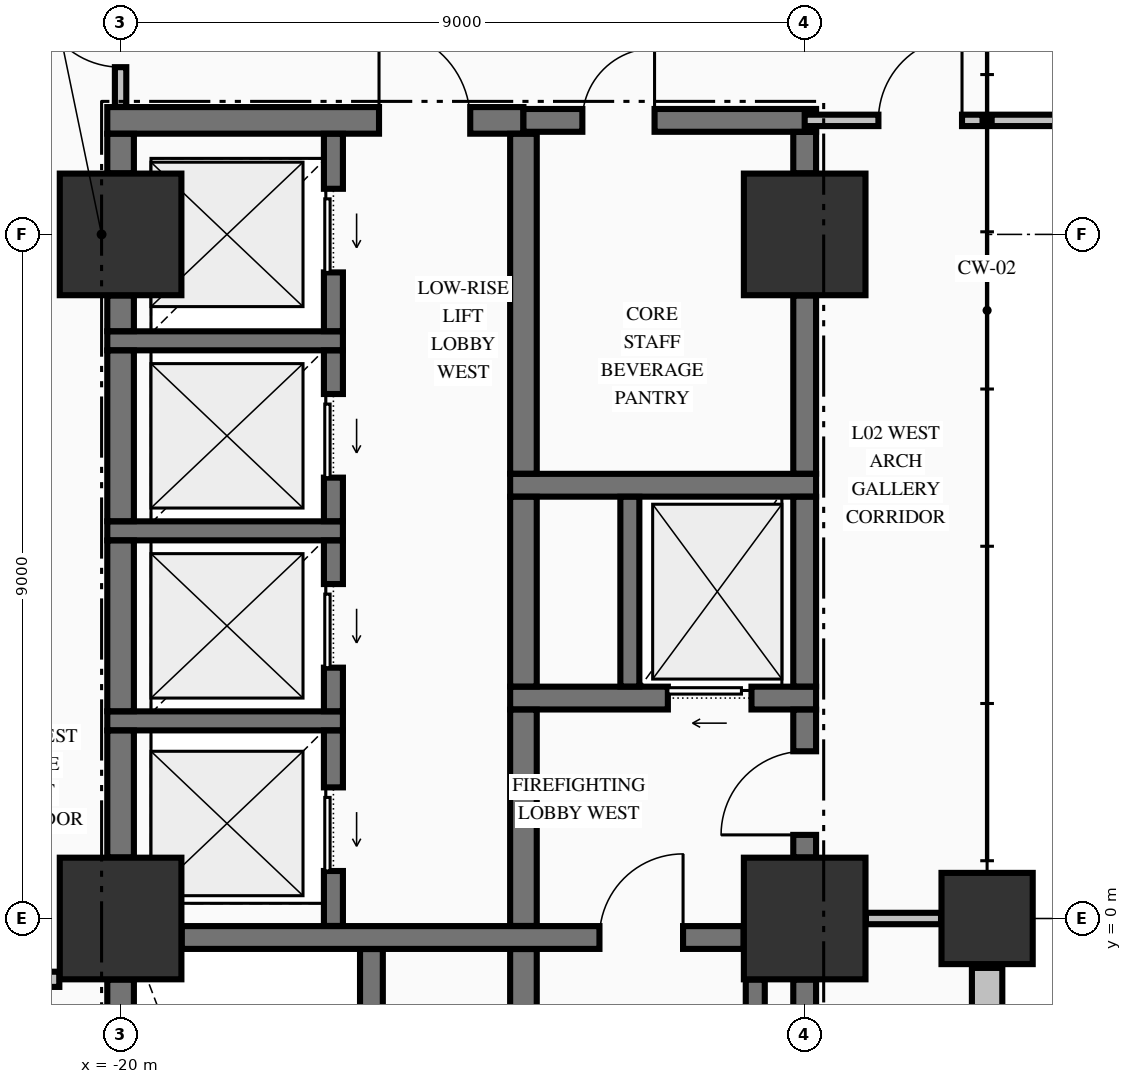
"""IFC4 building model, lengths in metres.
Left out: names, types, materials, properties, quantities, classifications, styles, units other than length and angle.
Written with IfcOpenShell. Run it as: python <this file> out.ifc"""

import sys

from ifc_helpers import new_model, si_unit, direction, frame, frame_2d, origin, origin_2d, place, context, subcontext, project, spatial, rectangle, extrude, element, fill, save


model = new_model("IFC4")
c1 = context("Model", 3, precision=1e-05, world=origin(), true_north=direction((0.0, 1.0)))
c2 = subcontext(c1, "Body", "Model", "MODEL_VIEW")
j1 = project(units=[si_unit("LENGTHUNIT", "METRE"), si_unit("PLANEANGLEUNIT", "RADIAN")], contexts=[c1])
p1 = place(None, origin())
s1 = spatial("IfcSite", under=j1, at=p1, CompositionType="ELEMENT")
p2 = place(p1, origin())
s2 = spatial("IfcBuilding", under=s1, at=p2, CompositionType="ELEMENT")
p3 = place(p2, frame((0.0, 0.0, 10.88)))
s3 = spatial("IfcBuildingStorey", under=s2, at=p3, CompositionType="ELEMENT", Elevation=10.88)
for number, where, z_axis, x_axis in (
    (1, (-20.0, 0.0, 0.0), (0.0, 0.0, 1.0), (1.0, 0.0, 0.0)),
    (2, (-20.0, 9.0, 0.0), (0.0, 0.0, 1.0), (1.0, 0.0, 0.0)),
    (3, (-11.0, 0.0, 0.0), (0.0, 0.0, 1.0), (1.0, 0.0, 0.0)),
    (4, (-11.0, 9.0, 0.0), (0.0, 0.0, 1.0), (1.0, 0.0, 0.0)),
):
    element("IfcColumn", number, at=place(p3, frame(where, z_axis=z_axis, x_axis=x_axis)), inside=s3, PredefinedType="COLUMN", context=c2, shape_type="SweptSolid", body=[
        extrude(rectangle(XDim=1.6, YDim=1.6, at=origin_2d()), origin(), (0.0, 0.0, 1.0), 5.09),
    ])
p4 = place(p3, frame((-8.6, 0.0, 0.0), z_axis=(0.0, 0.0, 1.0), x_axis=(1.0, 0.0, 0.0)))
e5 = element("IfcColumn", 5, at=p4, inside=s3, PredefinedType="COLUMN", context=c2, shape_type="SweptSolid", body=[
    extrude(rectangle(XDim=1.2, YDim=1.2, at=origin_2d()), origin(), (0.0, 0.0, 1.0), 5.09),
])
p5 = place(p3, frame((-8.6, -25.37, 0.0), z_axis=(0.0, 0.0, 1.0), x_axis=(0.0, 1.0, 0.0)))
e6 = element("IfcWall", 6, at=p5, inside=s3, PredefinedType="STANDARD", context=c2, shape_type="SweptSolid", body=[
    extrude(rectangle(XDim=24.72, YDim=0.4, at=frame_2d((12.36, 0.0))), origin(), (0.0, 0.0, 1.0), 4.132),
])
p6 = place(p3, frame((-19.196, -0.25, 0.0), z_axis=(0.0, 0.0, 1.0), x_axis=(1.0, 0.0, 0.0)))
e7 = element("IfcWall", 7, at=p6, inside=s3, PredefinedType="SHEAR", context=c2, shape_type="SweptSolid", body=[
    extrude(rectangle(XDim=7.392, YDim=0.3, at=frame_2d((3.696, 0.0))), origin(), (0.0, 0.0, 1.0), 5.09),
])
p7 = place(p6, frame((5.496, 0.0, 0.0)))
e8 = element("IfcOpeningElement", 8, at=p7, cuts=e7, PredefinedType="OPENING", context=c2, shape_type="SweptSolid", body=[
    extrude(rectangle(XDim=1.1, YDim=2.15, at=frame_2d((0.55, 1.075))), frame((0.0, 0.16, 0.0), z_axis=(0.0, -1.0, 0.0), x_axis=(1.0, 0.0, 0.0)), (0.0, 0.0, 1.0), 0.32),
])
p8 = place(p3, frame((-20.175, 2.6, 0.0), z_axis=(0.0, 0.0, 1.0), x_axis=(1.0, 0.0, 0.0)))
e9 = element("IfcWall", 9, at=p8, inside=s3, PredefinedType="SOLIDWALL", context=c2, shape_type="SweptSolid", body=[
    extrude(rectangle(XDim=3.1, YDim=0.25, at=frame_2d((1.55, 0.0))), origin(), (0.0, 0.0, 1.0), 5.09),
])
p9 = place(p3, frame((-14.875, 2.9, 0.0), z_axis=(0.0, 0.0, 1.0), x_axis=(1.0, 0.0, 0.0)))
e10 = element("IfcWall", 10, at=p9, inside=s3, PredefinedType="SHEAR", context=c2, shape_type="SweptSolid", body=[
    extrude(rectangle(XDim=4.025, YDim=0.3, at=frame_2d((2.012, 0.0))), origin(), (0.0, 0.0, 1.0), 5.09),
])
p10 = place(p9, frame((2.075, 0.0, 0.0)))
e11 = element("IfcOpeningElement", 11, at=p10, cuts=e10, PredefinedType="OPENING", context=c2, shape_type="SweptSolid", body=[
    extrude(rectangle(XDim=1.1, YDim=2.2, at=frame_2d((0.55, 1.1))), frame((0.0, 0.16, 0.0), z_axis=(0.0, -1.0, 0.0), x_axis=(1.0, 0.0, 0.0)), (0.0, 0.0, 1.0), 0.32),
])
p11 = place(p3, frame((-20.175, 5.1, 0.0), z_axis=(0.0, 0.0, 1.0), x_axis=(1.0, 0.0, 0.0)))
e12 = element("IfcWall", 12, at=p11, inside=s3, PredefinedType="SOLIDWALL", context=c2, shape_type="SweptSolid", body=[
    extrude(rectangle(XDim=3.1, YDim=0.25, at=frame_2d((1.55, 0.0))), origin(), (0.0, 0.0, 1.0), 5.09),
])
p12 = place(p3, frame((-14.875, 5.7, 0.0), z_axis=(0.0, 0.0, 1.0), x_axis=(1.0, 0.0, 0.0)))
e13 = element("IfcWall", 13, at=p12, inside=s3, PredefinedType="SHEAR", context=c2, shape_type="SweptSolid", body=[
    extrude(rectangle(XDim=4.025, YDim=0.3, at=frame_2d((2.012, 0.0))), origin(), (0.0, 0.0, 1.0), 5.09),
])
p13 = place(p3, frame((-20.175, 7.6, 0.0), z_axis=(0.0, 0.0, 1.0), x_axis=(1.0, 0.0, 0.0)))
e14 = element("IfcWall", 14, at=p13, inside=s3, PredefinedType="SOLIDWALL", context=c2, shape_type="SweptSolid", body=[
    extrude(rectangle(XDim=3.1, YDim=0.25, at=frame_2d((1.55, 0.0))), origin(), (0.0, 0.0, 1.0), 5.09),
])
p14 = place(p3, frame((-20.175, 10.5, 0.0), z_axis=(0.0, 0.0, 1.0), x_axis=(1.0, 0.0, 0.0)))
e15 = element("IfcWall", 15, at=p14, inside=s3, PredefinedType="SHEAR", context=c2, shape_type="SweptSolid", body=[
    extrude(rectangle(XDim=5.475, YDim=0.35, at=frame_2d((2.738, 0.0))), origin(), (0.0, 0.0, 1.0), 5.09),
])
p15 = place(p14, frame((3.575, 0.0, 0.0)))
e16 = element("IfcOpeningElement", 16, at=p15, cuts=e15, PredefinedType="OPENING", context=c2, shape_type="SweptSolid", body=[
    extrude(rectangle(XDim=1.2, YDim=2.15, at=frame_2d((0.6, 1.075))), frame((0.0, 0.185, 0.0), z_axis=(0.0, -1.0, 0.0), x_axis=(1.0, 0.0, 0.0)), (0.0, 0.0, 1.0), 0.37),
])
p16 = place(p3, frame((-14.7, 10.5, 0.0), z_axis=(0.0, 0.0, 1.0), x_axis=(1.0, 0.0, 0.0)))
e17 = element("IfcWall", 17, at=p16, inside=s3, PredefinedType="SHEAR", context=c2, shape_type="SweptSolid", body=[
    extrude(rectangle(XDim=3.85, YDim=0.3, at=frame_2d((1.925, 0.0))), origin(), (0.0, 0.0, 1.0), 5.09),
])
p17 = place(p16, frame((0.775, 0.0, 0.0)))
e18 = element("IfcOpeningElement", 18, at=p17, cuts=e17, PredefinedType="OPENING", context=c2, shape_type="SweptSolid", body=[
    extrude(rectangle(XDim=0.95, YDim=2.15, at=frame_2d((0.475, 1.075))), frame((0.0, 0.16, 0.0), z_axis=(0.0, -1.0, 0.0), x_axis=(1.0, 0.0, 0.0)), (0.0, 0.0, 1.0), 0.32),
])
p18 = place(p3, frame((-22.475, -0.8, 0.0), z_axis=(0.0, 0.0, 1.0), x_axis=(1.0, 0.0, 0.0)))
e19 = element("IfcWall", 19, at=p18, inside=s3, PredefinedType="PARTITIONING", context=c2, shape_type="SweptSolid", body=[
    extrude(rectangle(XDim=1.669, YDim=0.2, at=frame_2d((0.834, 0.0))), origin(), (0.0, 0.0, 1.0), 5.09),
])
p19 = place(p18, frame((0.425, 0.0, 0.0)))
e20 = element("IfcOpeningElement", 20, at=p19, cuts=e19, PredefinedType="OPENING", context=c2, shape_type="SweptSolid", body=[
    extrude(rectangle(XDim=1.0, YDim=2.15, at=frame_2d((0.5, 1.075))), frame((0.0, 0.11, 0.0), z_axis=(0.0, -1.0, 0.0), x_axis=(1.0, 0.0, 0.0)), (0.0, 0.0, 1.0), 0.22),
])
p20 = place(p3, frame((-10.194, 0.0, 0.0), z_axis=(0.0, 0.0, 1.0), x_axis=(1.0, 0.0, 0.0)))
e21 = element("IfcWall", 21, at=p20, inside=s3, PredefinedType="PARTITIONING", context=c2, shape_type="SweptSolid", body=[
    extrude(rectangle(XDim=0.988, YDim=0.15, at=frame_2d((0.494, 0.0))), origin(), (0.0, 0.0, 1.0), 4.132),
])
p21 = place(p3, frame((-11.0, 10.5, 0.0), z_axis=(0.0, 0.0, 1.0), x_axis=(1.0, 0.0, 0.0)))
e22 = element("IfcWall", 22, at=p21, inside=s3, PredefinedType="PARTITIONING", context=c2, shape_type="SweptSolid", body=[
    extrude(rectangle(XDim=2.34, YDim=0.15, at=frame_2d((1.17, 0.0))), origin(), (0.0, 0.0, 1.0), 5.09),
])
p22 = place(p21, frame((0.97, 0.0, 0.0)))
e23 = element("IfcOpeningElement", 23, at=p22, cuts=e22, PredefinedType="OPENING", context=c2, shape_type="SweptSolid", body=[
    extrude(rectangle(XDim=1.1, YDim=2.15, at=frame_2d((0.55, 1.075))), frame((0.0, 0.085, 0.0), z_axis=(0.0, -1.0, 0.0), x_axis=(1.0, 0.0, 0.0)), (0.0, 0.0, 1.0), 0.17),
])
p23 = place(p3, frame((-8.54, 10.5, 0.0), z_axis=(0.0, 0.0, 1.0), x_axis=(1.0, 0.0, 0.0)))
e24 = element("IfcWall", 24, at=p23, inside=s3, PredefinedType="PARTITIONING", context=c2, shape_type="SweptSolid", body=[
    extrude(rectangle(XDim=17.08, YDim=0.15, at=frame_2d((8.54, 0.0))), origin(), (0.0, 0.0, 1.0), 5.09),
])
p24 = place(p3, frame((-20.0, -8.196, 0.0), z_axis=(0.0, 0.0, 1.0), x_axis=(0.0, 1.0, 0.0)))
e25 = element("IfcWall", 25, at=p24, inside=s3, PredefinedType="SHEAR", context=c2, shape_type="SweptSolid", body=[
    extrude(rectangle(XDim=7.392, YDim=0.35, at=frame_2d((3.696, 0.0))), origin(), (0.0, 0.0, 1.0), 5.09),
])
p25 = place(p3, frame((-20.0, 0.804, 0.0), z_axis=(0.0, 0.0, 1.0), x_axis=(0.0, 1.0, 0.0)))
e26 = element("IfcWall", 26, at=p25, inside=s3, PredefinedType="SHEAR", context=c2, shape_type="SweptSolid", body=[
    extrude(rectangle(XDim=1.669, YDim=0.35, at=frame_2d((0.834, 0.0))), origin(), (0.0, 0.0, 1.0), 5.09),
])
for number, where, z_axis, x_axis in (
    (27, (-20.0, 2.727, 0.0), (0.0, 0.0, 1.0), (0.0, 1.0, 0.0)),
    (28, (-20.0, 5.227, 0.0), (0.0, 0.0, 1.0), (0.0, 1.0, 0.0)),
):
    element("IfcWall", number, at=place(p3, frame(where, z_axis=z_axis, x_axis=x_axis)), inside=s3, PredefinedType="SHEAR", context=c2, shape_type="SweptSolid", body=[
        extrude(rectangle(XDim=2.246, YDim=0.35, at=frame_2d((1.123, 0.0))), origin(), (0.0, 0.0, 1.0), 5.09),
    ])
p26 = place(p3, frame((-20.0, 7.727, 0.0), z_axis=(0.0, 0.0, 1.0), x_axis=(0.0, 1.0, 0.0)))
e29 = element("IfcWall", 29, at=p26, inside=s3, PredefinedType="SHEAR", context=c2, shape_type="SweptSolid", body=[
    extrude(rectangle(XDim=0.469, YDim=0.35, at=frame_2d((0.234, 0.0))), origin(), (0.0, 0.0, 1.0), 5.09),
])
p27 = place(p3, frame((-20.0, 9.804, 0.0), z_axis=(0.0, 0.0, 1.0), x_axis=(0.0, 1.0, 0.0)))
e30 = element("IfcWall", 30, at=p27, inside=s3, PredefinedType="SHEAR", context=c2, shape_type="SweptSolid", body=[
    extrude(rectangle(XDim=0.519, YDim=0.35, at=frame_2d((0.26, 0.0))), origin(), (0.0, 0.0, 1.0), 5.09),
])
p28 = place(p3, frame((-17.2, -0.098, 0.0), z_axis=(0.0, 0.0, 1.0), x_axis=(0.0, 1.0, 0.0)))
e31 = element("IfcWall", 31, at=p28, inside=s3, PredefinedType="SOLIDWALL", context=c2, shape_type="SweptSolid", body=[
    extrude(rectangle(XDim=2.571, YDim=0.25, at=frame_2d((1.285, 0.0))), origin(), (0.0, 0.0, 1.0), 5.09),
])
p29 = place(p28, frame((0.723, 0.0, 0.0)))
e32 = element("IfcOpeningElement", 32, at=p29, cuts=e31, PredefinedType="OPENING", context=c2, shape_type="SweptSolid", body=[
    extrude(rectangle(XDim=1.1, YDim=2.2, at=frame_2d((0.55, 1.1))), frame((0.0, 0.135, 0.0), z_axis=(0.0, -1.0, 0.0), x_axis=(1.0, 0.0, 0.0)), (0.0, 0.0, 1.0), 0.27),
])
p30 = place(p3, frame((-17.2, 2.727, 0.0), z_axis=(0.0, 0.0, 1.0), x_axis=(0.0, 1.0, 0.0)))
e33 = element("IfcWall", 33, at=p30, inside=s3, PredefinedType="SOLIDWALL", context=c2, shape_type="SweptSolid", body=[
    extrude(rectangle(XDim=2.246, YDim=0.25, at=frame_2d((1.123, 0.0))), origin(), (0.0, 0.0, 1.0), 5.09),
])
p31 = place(p30, frame((0.573, 0.0, 0.0)))
e34 = element("IfcOpeningElement", 34, at=p31, cuts=e33, PredefinedType="OPENING", context=c2, shape_type="SweptSolid", body=[
    extrude(rectangle(XDim=1.1, YDim=2.2, at=frame_2d((0.55, 1.1))), frame((0.0, 0.135, 0.0), z_axis=(0.0, -1.0, 0.0), x_axis=(1.0, 0.0, 0.0)), (0.0, 0.0, 1.0), 0.27),
])
p32 = place(p3, frame((-17.2, 5.227, 0.0), z_axis=(0.0, 0.0, 1.0), x_axis=(0.0, 1.0, 0.0)))
e35 = element("IfcWall", 35, at=p32, inside=s3, PredefinedType="SOLIDWALL", context=c2, shape_type="SweptSolid", body=[
    extrude(rectangle(XDim=2.246, YDim=0.25, at=frame_2d((1.123, 0.0))), origin(), (0.0, 0.0, 1.0), 5.09),
])
p33 = place(p32, frame((0.573, 0.0, 0.0)))
e36 = element("IfcOpeningElement", 36, at=p33, cuts=e35, PredefinedType="OPENING", context=c2, shape_type="SweptSolid", body=[
    extrude(rectangle(XDim=1.1, YDim=2.2, at=frame_2d((0.55, 1.1))), frame((0.0, 0.135, 0.0), z_axis=(0.0, -1.0, 0.0), x_axis=(1.0, 0.0, 0.0)), (0.0, 0.0, 1.0), 0.27),
])
p34 = place(p3, frame((-17.2, 7.727, 0.0), z_axis=(0.0, 0.0, 1.0), x_axis=(0.0, 1.0, 0.0)))
e37 = element("IfcWall", 37, at=p34, inside=s3, PredefinedType="SOLIDWALL", context=c2, shape_type="SweptSolid", body=[
    extrude(rectangle(XDim=2.596, YDim=0.25, at=frame_2d((1.298, 0.0))), origin(), (0.0, 0.0, 1.0), 5.09),
])
p35 = place(p34, frame((0.773, 0.0, 0.0)))
e38 = element("IfcOpeningElement", 38, at=p35, cuts=e37, PredefinedType="OPENING", context=c2, shape_type="SweptSolid", body=[
    extrude(rectangle(XDim=1.1, YDim=2.2, at=frame_2d((0.55, 1.1))), frame((0.0, 0.135, 0.0), z_axis=(0.0, -1.0, 0.0), x_axis=(1.0, 0.0, 0.0)), (0.0, 0.0, 1.0), 0.27),
])
p36 = place(p3, frame((-16.7, -9.773, 0.0), z_axis=(0.0, 0.0, 1.0), x_axis=(0.0, 1.0, 0.0)))
e39 = element("IfcWall", 39, at=p36, inside=s3, PredefinedType="SHEAR", context=c2, shape_type="SweptSolid", body=[
    extrude(rectangle(XDim=9.371, YDim=0.3, at=frame_2d((4.686, 0.0))), origin(), (0.0, 0.0, 1.0), 5.09),
])
p37 = place(p3, frame((-14.7, -9.773, 0.0), z_axis=(0.0, 0.0, 1.0), x_axis=(0.0, 1.0, 0.0)))
e40 = element("IfcWall", 40, at=p37, inside=s3, PredefinedType="SHEAR", context=c2, shape_type="SweptSolid", body=[
    extrude(rectangle(XDim=9.371, YDim=0.35, at=frame_2d((4.686, 0.0))), origin(), (0.0, 0.0, 1.0), 5.09),
])
p38 = place(p3, frame((-14.7, -0.098, 0.0), z_axis=(0.0, 0.0, 1.0), x_axis=(0.0, 1.0, 0.0)))
e41 = element("IfcWall", 41, at=p38, inside=s3, PredefinedType="SHEAR", context=c2, shape_type="SweptSolid", body=[
    extrude(rectangle(XDim=2.846, YDim=0.35, at=frame_2d((1.423, 0.0))), origin(), (0.0, 0.0, 1.0), 5.09),
])
p39 = place(p3, frame((-14.7, 3.052, 0.0), z_axis=(0.0, 0.0, 1.0), x_axis=(0.0, 1.0, 0.0)))
e42 = element("IfcWall", 42, at=p39, inside=s3, PredefinedType="SHEAR", context=c2, shape_type="SweptSolid", body=[
    extrude(rectangle(XDim=2.496, YDim=0.35, at=frame_2d((1.248, 0.0))), origin(), (0.0, 0.0, 1.0), 5.09),
])
p40 = place(p3, frame((-14.7, 5.852, 0.0), z_axis=(0.0, 0.0, 1.0), x_axis=(0.0, 1.0, 0.0)))
e43 = element("IfcWall", 43, at=p40, inside=s3, PredefinedType="SHEAR", context=c2, shape_type="SweptSolid", body=[
    extrude(rectangle(XDim=4.471, YDim=0.35, at=frame_2d((2.235, 0.0))), origin(), (0.0, 0.0, 1.0), 5.09),
])
p41 = place(p3, frame((-13.3, 3.052, 0.0), z_axis=(0.0, 0.0, 1.0), x_axis=(0.0, 1.0, 0.0)))
e44 = element("IfcWall", 44, at=p41, inside=s3, PredefinedType="SOLIDWALL", context=c2, shape_type="SweptSolid", body=[
    extrude(rectangle(XDim=2.496, YDim=0.25, at=frame_2d((1.248, 0.0))), origin(), (0.0, 0.0, 1.0), 5.09),
])
p42 = place(p3, frame((-11.65, -8.196, 0.0), z_axis=(0.0, 0.0, 1.0), x_axis=(0.0, 1.0, 0.0)))
e45 = element("IfcWall", 45, at=p42, inside=s3, PredefinedType="SOLIDWALL", context=c2, shape_type="SweptSolid", body=[
    extrude(rectangle(XDim=7.392, YDim=0.25, at=frame_2d((3.696, 0.0))), origin(), (0.0, 0.0, 1.0), 5.09),
])
p43 = place(p3, frame((-11.0, -8.196, 0.0), z_axis=(0.0, 0.0, 1.0), x_axis=(0.0, 1.0, 0.0)))
e46 = element("IfcWall", 46, at=p43, inside=s3, PredefinedType="SHEAR", context=c2, shape_type="SweptSolid", body=[
    extrude(rectangle(XDim=7.392, YDim=0.3, at=frame_2d((3.696, 0.0))), origin(), (0.0, 0.0, 1.0), 5.09),
])
p44 = place(p3, frame((-11.0, 0.804, 0.0), z_axis=(0.0, 0.0, 1.0), x_axis=(0.0, 1.0, 0.0)))
e47 = element("IfcWall", 47, at=p44, inside=s3, PredefinedType="SHEAR", context=c2, shape_type="SweptSolid", body=[
    extrude(rectangle(XDim=1.944, YDim=0.3, at=frame_2d((0.972, 0.0))), origin(), (0.0, 0.0, 1.0), 5.09),
])
p45 = place(p44, frame((0.296, 0.0, 0.0)))
e48 = element("IfcOpeningElement", 48, at=p45, cuts=e47, PredefinedType="OPENING", context=c2, shape_type="SweptSolid", body=[
    extrude(rectangle(XDim=1.1, YDim=2.15, at=frame_2d((0.55, 1.075))), frame((0.0, 0.16, 0.0), z_axis=(0.0, -1.0, 0.0), x_axis=(1.0, 0.0, 0.0)), (0.0, 0.0, 1.0), 0.32),
])
p46 = place(p3, frame((-11.0, 3.052, 0.0), z_axis=(0.0, 0.0, 1.0), x_axis=(0.0, 1.0, 0.0)))
e49 = element("IfcWall", 49, at=p46, inside=s3, PredefinedType="SHEAR", context=c2, shape_type="SweptSolid", body=[
    extrude(rectangle(XDim=2.496, YDim=0.3, at=frame_2d((1.248, 0.0))), origin(), (0.0, 0.0, 1.0), 5.09),
])
p47 = place(p3, frame((-11.0, 5.852, 0.0), z_axis=(0.0, 0.0, 1.0), x_axis=(0.0, 1.0, 0.0)))
e50 = element("IfcWall", 50, at=p47, inside=s3, PredefinedType="SHEAR", context=c2, shape_type="SweptSolid", body=[
    extrude(rectangle(XDim=2.344, YDim=0.3, at=frame_2d((1.172, 0.0))), origin(), (0.0, 0.0, 1.0), 5.09),
])
p48 = place(p3, frame((-11.0, 9.804, 0.0), z_axis=(0.0, 0.0, 1.0), x_axis=(0.0, 1.0, 0.0)))
e51 = element("IfcWall", 51, at=p48, inside=s3, PredefinedType="SHEAR", context=c2, shape_type="SweptSolid", body=[
    extrude(rectangle(XDim=0.544, YDim=0.3, at=frame_2d((0.272, 0.0))), origin(), (0.0, 0.0, 1.0), 5.09),
])
p49 = place(p3, frame((-20.0, 10.678, 0.0), z_axis=(0.0, 0.0, 1.0), x_axis=(0.0, 1.0, 0.0)))
e52 = element("IfcWall", 52, at=p49, inside=s3, PredefinedType="PARTITIONING", context=c2, shape_type="SweptSolid", body=[
    extrude(rectangle(XDim=2.244, YDim=0.15, at=frame_2d((1.122, 0.0))), origin(), (0.0, 0.0, 1.0), 4.132),
])
p50 = place(p49, frame((0.522, 0.0, 0.0)))
e53 = element("IfcOpeningElement", 53, at=p50, cuts=e52, PredefinedType="OPENING", context=c2, shape_type="SweptSolid", body=[
    extrude(rectangle(XDim=1.1, YDim=2.15, at=frame_2d((0.55, 1.075))), frame((0.0, 0.085, 0.0), z_axis=(0.0, -1.0, 0.0), x_axis=(1.0, 0.0, 0.0)), (0.0, 0.0, 1.0), 0.17),
])
p51 = place(p7, origin())
e54 = element("IfcDoor", 54, at=p51, inside=s3, OperationType="SINGLE_SWING_RIGHT", PredefinedType="DOOR", context=c2, shape_type="SweptSolid", body=[
    extrude(rectangle(XDim=1.1, YDim=2.15, at=frame_2d((0.55, 1.075))), frame((0.0, 0.025, 0.0), z_axis=(0.0, -1.0, 0.0), x_axis=(1.0, 0.0, 0.0)), (0.0, 0.0, 1.0), 0.05),
])
fill(e8, e54)
p52 = place(p45, origin())
e55 = element("IfcDoor", 55, at=p52, inside=s3, OperationType="SINGLE_SWING_LEFT", PredefinedType="DOOR", context=c2, shape_type="SweptSolid", body=[
    extrude(rectangle(XDim=1.1, YDim=2.15, at=frame_2d((0.55, 1.075))), frame((0.0, 0.025, 0.0), z_axis=(0.0, -1.0, 0.0), x_axis=(1.0, 0.0, 0.0)), (0.0, 0.0, 1.0), 0.05),
])
fill(e48, e55)
p53 = place(p10, origin())
e56 = element("IfcDoor", 56, at=p53, inside=s3, OperationType="SLIDING_TO_LEFT", PredefinedType="DOOR", context=c2, shape_type="SweptSolid", body=[
    extrude(rectangle(XDim=1.1, YDim=2.2, at=frame_2d((0.55, 1.1))), frame((0.0, 0.025, 0.0), z_axis=(0.0, -1.0, 0.0), x_axis=(1.0, 0.0, 0.0)), (0.0, 0.0, 1.0), 0.05),
])
fill(e11, e56)
p54 = place(p17, origin())
e57 = element("IfcDoor", 57, at=p54, inside=s3, OperationType="SINGLE_SWING_RIGHT", PredefinedType="DOOR", context=c2, shape_type="SweptSolid", body=[
    extrude(rectangle(XDim=0.95, YDim=2.15, at=frame_2d((0.475, 1.075))), frame((0.0, 0.025, 0.0), z_axis=(0.0, -1.0, 0.0), x_axis=(1.0, 0.0, 0.0)), (0.0, 0.0, 1.0), 0.05),
])
fill(e18, e57)
p55 = place(p15, origin())
e58 = element("IfcDoor", 58, at=p55, inside=s3, OperationType="SINGLE_SWING_LEFT", PredefinedType="DOOR", context=c2, shape_type="SweptSolid", body=[
    extrude(rectangle(XDim=1.2, YDim=2.15, at=frame_2d((0.6, 1.075))), frame((0.0, 0.025, 0.0), z_axis=(0.0, -1.0, 0.0), x_axis=(1.0, 0.0, 0.0)), (0.0, 0.0, 1.0), 0.05),
])
fill(e16, e58)
p56 = place(p29, origin())
e59 = element("IfcDoor", 59, at=p56, inside=s3, OperationType="SLIDING_TO_LEFT", PredefinedType="DOOR", context=c2, shape_type="SweptSolid", body=[
    extrude(rectangle(XDim=1.1, YDim=2.2, at=frame_2d((0.55, 1.1))), frame((0.0, 0.025, 0.0), z_axis=(0.0, -1.0, 0.0), x_axis=(1.0, 0.0, 0.0)), (0.0, 0.0, 1.0), 0.05),
])
fill(e32, e59)
p57 = place(p31, origin())
e60 = element("IfcDoor", 60, at=p57, inside=s3, OperationType="SLIDING_TO_LEFT", PredefinedType="DOOR", context=c2, shape_type="SweptSolid", body=[
    extrude(rectangle(XDim=1.1, YDim=2.2, at=frame_2d((0.55, 1.1))), frame((0.0, 0.025, 0.0), z_axis=(0.0, -1.0, 0.0), x_axis=(1.0, 0.0, 0.0)), (0.0, 0.0, 1.0), 0.05),
])
fill(e34, e60)
p58 = place(p33, origin())
e61 = element("IfcDoor", 61, at=p58, inside=s3, OperationType="SLIDING_TO_LEFT", PredefinedType="DOOR", context=c2, shape_type="SweptSolid", body=[
    extrude(rectangle(XDim=1.1, YDim=2.2, at=frame_2d((0.55, 1.1))), frame((0.0, 0.025, 0.0), z_axis=(0.0, -1.0, 0.0), x_axis=(1.0, 0.0, 0.0)), (0.0, 0.0, 1.0), 0.05),
])
fill(e36, e61)
p59 = place(p35, origin())
e62 = element("IfcDoor", 62, at=p59, inside=s3, OperationType="SLIDING_TO_LEFT", PredefinedType="DOOR", context=c2, shape_type="SweptSolid", body=[
    extrude(rectangle(XDim=1.1, YDim=2.2, at=frame_2d((0.55, 1.1))), frame((0.0, 0.025, 0.0), z_axis=(0.0, -1.0, 0.0), x_axis=(1.0, 0.0, 0.0)), (0.0, 0.0, 1.0), 0.05),
])
fill(e38, e62)
p60 = place(p22, origin())
e63 = element("IfcDoor", 63, at=p60, inside=s3, OperationType="SINGLE_SWING_RIGHT", PredefinedType="DOOR", context=c2, shape_type="SweptSolid", body=[
    extrude(rectangle(XDim=1.1, YDim=2.15, at=frame_2d((0.55, 1.075))), frame((0.0, 0.025, 0.0), z_axis=(0.0, -1.0, 0.0), x_axis=(1.0, 0.0, 0.0)), (0.0, 0.0, 1.0), 0.05),
])
fill(e23, e63)
p61 = place(p50, origin())
e64 = element("IfcDoor", 64, at=p61, inside=s3, OperationType="SINGLE_SWING_RIGHT", PredefinedType="DOOR", context=c2, shape_type="SweptSolid", body=[
    extrude(rectangle(XDim=1.1, YDim=2.15, at=frame_2d((0.55, 1.075))), frame((0.0, 0.025, 0.0), z_axis=(0.0, -1.0, 0.0), x_axis=(1.0, 0.0, 0.0)), (0.0, 0.0, 1.0), 0.05),
])
fill(e53, e64)
save(model, sys.argv[1])
